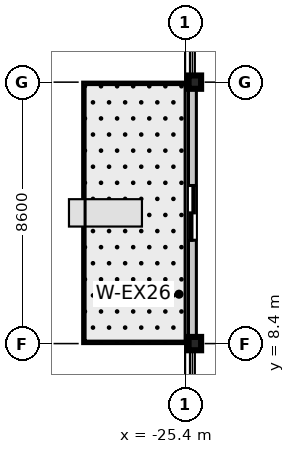
"""IFC4 building model, lengths in metres.
Left out: names, types, materials, properties, quantities, classifications, styles, units other than length and angle.
Written with IfcOpenShell. Run it as: python <this file> out.ifc"""

import sys

from ifc_helpers import new_model, si_unit, direction, frame, frame_2d, origin, origin_2d, place, context, subcontext, project, spatial, rectangle, i_section, extrude, source, transform, mapped, element, fill, save


model = new_model("IFC4")
c1 = context("Model", 3, precision=1e-05, world=origin(), true_north=direction((0.0, 1.0)))
c2 = subcontext(c1, "Body", "Model", "MODEL_VIEW")
j1 = project(units=[si_unit("LENGTHUNIT", "METRE"), si_unit("PLANEANGLEUNIT", "RADIAN")], contexts=[c1])
p1 = place(None, origin())
s1 = spatial("IfcSite", under=j1, at=p1, CompositionType="ELEMENT")
p2 = place(p1, origin())
s2 = spatial("IfcBuilding", under=s1, at=p2, CompositionType="ELEMENT")
p3 = place(p2, frame((0.0, 0.0, 76.2)))
s3 = spatial("IfcBuildingStorey", under=s2, at=p3, CompositionType="ELEMENT", Elevation=76.2)
m1 = source(origin(), c2, "Body", "SweptSolid", [
    extrude(i_section(OverallWidth=0.412, OverallDepth=0.438, WebThickness=0.023, FlangeThickness=0.036, at=origin_2d()), origin(), (0.0, 0.0, 1.0), 3.505),
])
for number, where, z_axis, x_axis in (
    (1, (-25.08, 8.4, 0.0), (0.0, 0.0, 1.0), (1.0, 0.0, 0.0)),
    (2, (-25.08, 17.0, 0.0), (0.0, 0.0, 1.0), (1.0, 0.0, 0.0)),
):
    element("IfcColumn", number, at=place(p3, frame(where, z_axis=z_axis, x_axis=x_axis)), inside=s3, PredefinedType="COLUMN", context=c2, shape_type="MappedRepresentation", body=[
        mapped(m1, transform((0.0, 0.0, 0.0), scale=1.0)),
    ])
m2 = source(origin(), c2, "Body", "SweptSolid", [
    extrude(rectangle(XDim=8.6, YDim=0.26, at=frame_2d((4.3, 0.0))), origin(), (0.0, 0.0, 1.0), 2.85),
])
p4 = place(p3, frame((-25.16, 8.4, 0.0), z_axis=(0.0, 0.0, 1.0), x_axis=(0.0, 1.0, 0.0)))
e3 = element("IfcWall", 3, at=p4, inside=s3, PredefinedType="STANDARD", context=c2, shape_type="MappedRepresentation", body=[
    mapped(m2, transform((0.0, 0.0, 0.0), scale=1.0)),
])
p5 = place(p4, frame((3.4, 0.0, 0.0)))
e4 = element("IfcOpeningElement", 4, at=p5, cuts=e3, PredefinedType="OPENING", context=c2, shape_type="SweptSolid", body=[
    extrude(rectangle(XDim=1.8, YDim=2.25, at=frame_2d((0.9, 1.125))), frame((0.0, 0.14, 0.0), z_axis=(0.0, -1.0, 0.0), x_axis=(1.0, 0.0, 0.0)), (0.0, 0.0, 1.0), 0.28),
])
m3 = source(origin(), c2, "Body", "SweptSolid", [
    extrude(rectangle(XDim=1.8, YDim=2.25, at=frame_2d((0.9, 1.125))), frame((0.0, 0.025, 0.0), z_axis=(0.0, -1.0, 0.0), x_axis=(1.0, 0.0, 0.0)), (0.0, 0.0, 1.0), 0.05),
])
p6 = place(p5, origin())
e5 = element("IfcDoor", 5, at=p6, inside=s3, OperationType="DOUBLE_DOOR_SLIDING", PredefinedType="DOOR", context=c2, shape_type="MappedRepresentation", body=[
    mapped(m3, transform((0.0, 0.0, 0.0), scale=1.0)),
])
fill(e4, e5)
save(model, sys.argv[1])
